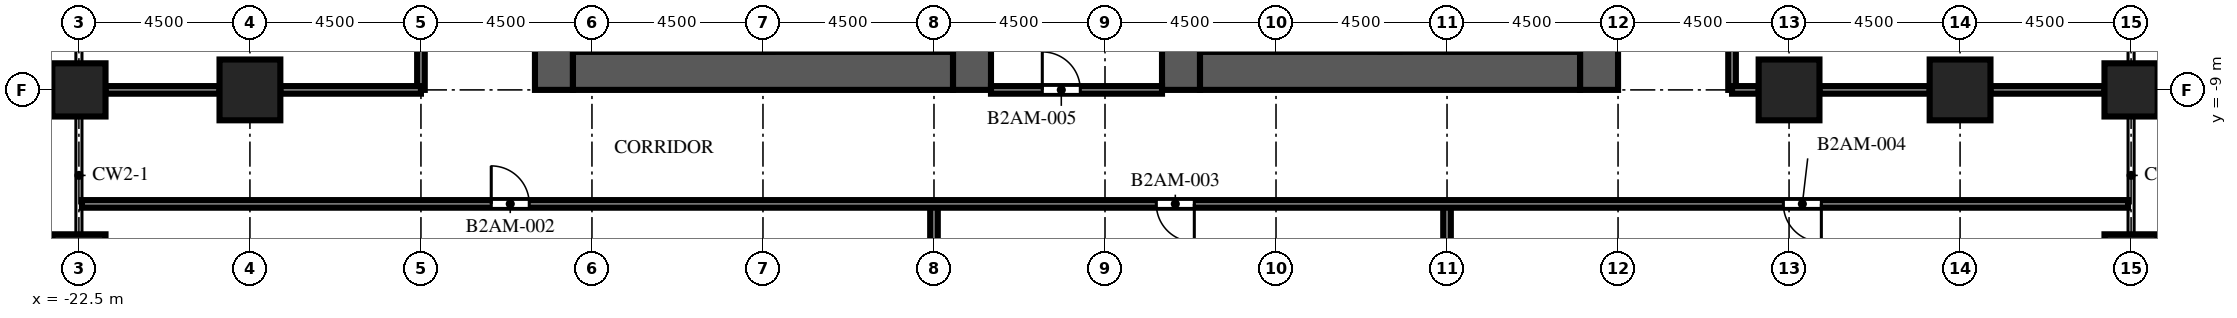
"""IFC4 building model, lengths in metres.
Left out: names, types, materials, properties, quantities, classifications, styles, units other than length and angle.
Written with IfcOpenShell. Run it as: python <this file> out.ifc"""

import sys

from ifc_helpers import new_model, si_unit, direction, frame, frame_2d, origin, origin_2d, place, context, subcontext, project, spatial, rectangle, extrude, element, fill, save


model = new_model("IFC4")
c1 = context("Model", 3, precision=1e-05, world=origin(), true_north=direction((0.0, 1.0)))
c2 = subcontext(c1, "Body", "Model", "MODEL_VIEW")
j1 = project(units=[si_unit("LENGTHUNIT", "METRE"), si_unit("PLANEANGLEUNIT", "RADIAN")], contexts=[c1])
p1 = place(None, origin())
s1 = spatial("IfcSite", under=j1, at=p1, CompositionType="ELEMENT")
p2 = place(p1, origin())
s2 = spatial("IfcBuilding", under=s1, at=p2, CompositionType="ELEMENT")
p3 = place(p2, frame((0.0, 0.0, 70.6)))
s3 = spatial("IfcBuildingStorey", under=s2, at=p3, CompositionType="ELEMENT", Elevation=70.6)
for number, where, z_axis, x_axis in (
    (1, (-22.5, -13.5, 0.0), (0.0, 0.0, 1.0), (1.0, 0.0, 0.0)),
    (2, (-22.5, -9.0, 0.0), (0.0, 0.0, 1.0), (1.0, 0.0, 0.0)),
    (3, (31.5, -13.5, 0.0), (0.0, 0.0, 1.0), (1.0, 0.0, 0.0)),
    (4, (31.5, -9.0, 0.0), (0.0, 0.0, 1.0), (1.0, 0.0, 0.0)),
):
    element("IfcColumn", number, at=place(p3, frame(where, z_axis=z_axis, x_axis=x_axis)), inside=s3, PredefinedType="COLUMN", context=c2, shape_type="SweptSolid", body=[
        extrude(rectangle(XDim=1.4, YDim=1.4, at=origin_2d()), origin(), (0.0, 0.0, 1.0), 6.0),
    ])
for number, where, z_axis, x_axis in (
    (5, (-18.0, -9.0, 0.0), (0.0, 0.0, 1.0), (1.0, 0.0, 0.0)),
    (6, (22.5, -9.0, 0.0), (0.0, 0.0, 1.0), (1.0, 0.0, 0.0)),
    (7, (27.0, -9.0, 0.0), (0.0, 0.0, 1.0), (1.0, 0.0, 0.0)),
):
    element("IfcColumn", number, at=place(p3, frame(where, z_axis=z_axis, x_axis=x_axis)), inside=s3, PredefinedType="COLUMN", context=c2, shape_type="SweptSolid", body=[
        extrude(rectangle(XDim=1.6, YDim=1.6, at=origin_2d()), origin(), (0.0, 0.0, 1.0), 6.0),
    ])
p4 = place(p3, frame((-10.0, -9.0, 0.0), z_axis=(0.0, 0.0, 1.0), x_axis=(0.0, 1.0, 0.0)))
e8 = element("IfcWall", 8, at=p4, inside=s3, PredefinedType="SHEAR", context=c2, shape_type="SweptSolid", body=[
    extrude(rectangle(XDim=27.5, YDim=1.0, at=frame_2d((13.75, 0.0))), origin(), (0.0, 0.0, 1.0), 6.0),
])
p5 = place(p4, frame((12.55, 0.0, 0.0)))
e9 = element("IfcOpeningElement", 9, at=p5, cuts=e8, PredefinedType="OPENING", context=c2, shape_type="SweptSolid", body=[
    extrude(rectangle(XDim=2.4, YDim=2.4, at=frame_2d((1.2, 1.2))), frame((0.0, 0.51, 0.0), z_axis=(0.0, -1.0, 0.0), x_axis=(1.0, 0.0, 0.0)), (0.0, 0.0, 1.0), 1.02),
])
p6 = place(p4, frame((6.825, 0.0, 0.0)))
e10 = element("IfcOpeningElement", 10, at=p6, cuts=e8, PredefinedType="OPENING", context=c2, shape_type="SweptSolid", body=[
    extrude(rectangle(XDim=1.2, YDim=2.1, at=frame_2d((0.6, 1.05))), frame((0.0, 0.51, 0.0), z_axis=(0.0, -1.0, 0.0), x_axis=(1.0, 0.0, 0.0)), (0.0, 0.0, 1.0), 1.02),
])
p7 = place(p4, frame((19.475, 0.0, 0.0)))
e11 = element("IfcOpeningElement", 11, at=p7, cuts=e8, PredefinedType="OPENING", context=c2, shape_type="SweptSolid", body=[
    extrude(rectangle(XDim=1.2, YDim=2.1, at=frame_2d((0.6, 1.05))), frame((0.0, 0.51, 0.0), z_axis=(0.0, -1.0, 0.0), x_axis=(1.0, 0.0, 0.0)), (0.0, 0.0, 1.0), 1.02),
])
p8 = place(p3, frame((1.0, -9.0, 0.0), z_axis=(0.0, 0.0, 1.0), x_axis=(0.0, 1.0, 0.0)))
e12 = element("IfcWall", 12, at=p8, inside=s3, PredefinedType="SHEAR", context=c2, shape_type="SweptSolid", body=[
    extrude(rectangle(XDim=27.5, YDim=1.0, at=frame_2d((13.75, 0.0))), origin(), (0.0, 0.0, 1.0), 6.0),
])
p9 = place(p8, frame((12.55, 0.0, 0.0)))
e13 = element("IfcOpeningElement", 13, at=p9, cuts=e12, PredefinedType="OPENING", context=c2, shape_type="SweptSolid", body=[
    extrude(rectangle(XDim=2.4, YDim=2.4, at=frame_2d((1.2, 1.2))), frame((0.0, 0.51, 0.0), z_axis=(0.0, -1.0, 0.0), x_axis=(1.0, 0.0, 0.0)), (0.0, 0.0, 1.0), 1.02),
])
p10 = place(p8, frame((5.475, 0.0, 0.0)))
e14 = element("IfcOpeningElement", 14, at=p10, cuts=e12, PredefinedType="OPENING", context=c2, shape_type="SweptSolid", body=[
    extrude(rectangle(XDim=1.2, YDim=2.1, at=frame_2d((0.6, 1.05))), frame((0.0, 0.51, 0.0), z_axis=(0.0, -1.0, 0.0), x_axis=(1.0, 0.0, 0.0)), (0.0, 0.0, 1.0), 1.02),
])
p11 = place(p8, frame((19.475, 0.0, 0.0)))
e15 = element("IfcOpeningElement", 15, at=p11, cuts=e12, PredefinedType="OPENING", context=c2, shape_type="SweptSolid", body=[
    extrude(rectangle(XDim=1.0, YDim=2.1, at=frame_2d((0.5, 1.05))), frame((0.0, 0.51, 0.0), z_axis=(0.0, -1.0, 0.0), x_axis=(1.0, 0.0, 0.0)), (0.0, 0.0, 1.0), 1.02),
])
p12 = place(p8, frame((21.106, 0.0, 0.0)))
e16 = element("IfcOpeningElement", 16, at=p12, cuts=e12, PredefinedType="OPENING", context=c2, shape_type="SweptSolid", body=[
    extrude(rectangle(XDim=1.0, YDim=2.1, at=frame_2d((0.5, 1.05))), frame((0.0, 0.51, 0.0), z_axis=(0.0, -1.0, 0.0), x_axis=(1.0, 0.0, 0.0)), (0.0, 0.0, 1.0), 1.02),
])
p13 = place(p8, frame((23.1, 0.0, 0.0)))
e17 = element("IfcOpeningElement", 17, at=p13, cuts=e12, PredefinedType="OPENING", context=c2, shape_type="SweptSolid", body=[
    extrude(rectangle(XDim=1.0, YDim=2.1, at=frame_2d((0.5, 1.05))), frame((0.0, 0.51, 0.0), z_axis=(0.0, -1.0, 0.0), x_axis=(1.0, 0.0, 0.0)), (0.0, 0.0, 1.0), 1.02),
])
p14 = place(p8, frame((25.094, 0.0, 0.0)))
e18 = element("IfcOpeningElement", 18, at=p14, cuts=e12, PredefinedType="OPENING", context=c2, shape_type="SweptSolid", body=[
    extrude(rectangle(XDim=1.0, YDim=2.1, at=frame_2d((0.5, 1.05))), frame((0.0, 0.51, 0.0), z_axis=(0.0, -1.0, 0.0), x_axis=(1.0, 0.0, 0.0)), (0.0, 0.0, 1.0), 1.02),
])
p15 = place(p3, frame((-9.5, -8.5, 0.0), z_axis=(0.0, 0.0, 1.0), x_axis=(1.0, 0.0, 0.0)))
e19 = element("IfcWall", 19, at=p15, inside=s3, PredefinedType="SHEAR", context=c2, shape_type="SweptSolid", body=[
    extrude(rectangle(XDim=10.0, YDim=1.0, at=frame_2d((5.0, 0.0))), origin(), (0.0, 0.0, 1.0), 6.0),
])
p16 = place(p3, frame((6.5, -9.0, 0.0), z_axis=(0.0, 0.0, 1.0), x_axis=(0.0, 1.0, 0.0)))
e20 = element("IfcWall", 20, at=p16, inside=s3, PredefinedType="SHEAR", context=c2, shape_type="SweptSolid", body=[
    extrude(rectangle(XDim=27.5, YDim=1.0, at=frame_2d((13.75, 0.0))), origin(), (0.0, 0.0, 1.0), 6.0),
])
p17 = place(p16, frame((12.55, 0.0, 0.0)))
e21 = element("IfcOpeningElement", 21, at=p17, cuts=e20, PredefinedType="OPENING", context=c2, shape_type="SweptSolid", body=[
    extrude(rectangle(XDim=2.4, YDim=2.4, at=frame_2d((1.2, 1.2))), frame((0.0, 0.51, 0.0), z_axis=(0.0, -1.0, 0.0), x_axis=(1.0, 0.0, 0.0)), (0.0, 0.0, 1.0), 1.02),
])
p18 = place(p16, frame((5.475, 0.0, 0.0)))
e22 = element("IfcOpeningElement", 22, at=p18, cuts=e20, PredefinedType="OPENING", context=c2, shape_type="SweptSolid", body=[
    extrude(rectangle(XDim=1.2, YDim=2.1, at=frame_2d((0.6, 1.05))), frame((0.0, 0.51, 0.0), z_axis=(0.0, -1.0, 0.0), x_axis=(1.0, 0.0, 0.0)), (0.0, 0.0, 1.0), 1.02),
])
p19 = place(p16, frame((19.475, 0.0, 0.0)))
e23 = element("IfcOpeningElement", 23, at=p19, cuts=e20, PredefinedType="OPENING", context=c2, shape_type="SweptSolid", body=[
    extrude(rectangle(XDim=1.0, YDim=2.1, at=frame_2d((0.5, 1.05))), frame((0.0, 0.51, 0.0), z_axis=(0.0, -1.0, 0.0), x_axis=(1.0, 0.0, 0.0)), (0.0, 0.0, 1.0), 1.02),
])
p20 = place(p16, frame((21.106, 0.0, 0.0)))
e24 = element("IfcOpeningElement", 24, at=p20, cuts=e20, PredefinedType="OPENING", context=c2, shape_type="SweptSolid", body=[
    extrude(rectangle(XDim=1.0, YDim=2.1, at=frame_2d((0.5, 1.05))), frame((0.0, 0.51, 0.0), z_axis=(0.0, -1.0, 0.0), x_axis=(1.0, 0.0, 0.0)), (0.0, 0.0, 1.0), 1.02),
])
p21 = place(p16, frame((23.1, 0.0, 0.0)))
e25 = element("IfcOpeningElement", 25, at=p21, cuts=e20, PredefinedType="OPENING", context=c2, shape_type="SweptSolid", body=[
    extrude(rectangle(XDim=1.0, YDim=2.1, at=frame_2d((0.5, 1.05))), frame((0.0, 0.51, 0.0), z_axis=(0.0, -1.0, 0.0), x_axis=(1.0, 0.0, 0.0)), (0.0, 0.0, 1.0), 1.02),
])
p22 = place(p16, frame((25.094, 0.0, 0.0)))
e26 = element("IfcOpeningElement", 26, at=p22, cuts=e20, PredefinedType="OPENING", context=c2, shape_type="SweptSolid", body=[
    extrude(rectangle(XDim=1.0, YDim=2.1, at=frame_2d((0.5, 1.05))), frame((0.0, 0.51, 0.0), z_axis=(0.0, -1.0, 0.0), x_axis=(1.0, 0.0, 0.0)), (0.0, 0.0, 1.0), 1.02),
])
p23 = place(p3, frame((17.5, -9.0, 0.0), z_axis=(0.0, 0.0, 1.0), x_axis=(0.0, 1.0, 0.0)))
e27 = element("IfcWall", 27, at=p23, inside=s3, PredefinedType="SHEAR", context=c2, shape_type="SweptSolid", body=[
    extrude(rectangle(XDim=27.5, YDim=1.0, at=frame_2d((13.75, 0.0))), origin(), (0.0, 0.0, 1.0), 6.0),
])
p24 = place(p23, frame((12.55, 0.0, 0.0)))
e28 = element("IfcOpeningElement", 28, at=p24, cuts=e27, PredefinedType="OPENING", context=c2, shape_type="SweptSolid", body=[
    extrude(rectangle(XDim=2.4, YDim=2.4, at=frame_2d((1.2, 1.2))), frame((0.0, 0.51, 0.0), z_axis=(0.0, -1.0, 0.0), x_axis=(1.0, 0.0, 0.0)), (0.0, 0.0, 1.0), 1.02),
])
p25 = place(p23, frame((6.825, 0.0, 0.0)))
e29 = element("IfcOpeningElement", 29, at=p25, cuts=e27, PredefinedType="OPENING", context=c2, shape_type="SweptSolid", body=[
    extrude(rectangle(XDim=1.2, YDim=2.1, at=frame_2d((0.6, 1.05))), frame((0.0, 0.51, 0.0), z_axis=(0.0, -1.0, 0.0), x_axis=(1.0, 0.0, 0.0)), (0.0, 0.0, 1.0), 1.02),
])
p26 = place(p23, frame((19.475, 0.0, 0.0)))
e30 = element("IfcOpeningElement", 30, at=p26, cuts=e27, PredefinedType="OPENING", context=c2, shape_type="SweptSolid", body=[
    extrude(rectangle(XDim=1.2, YDim=2.1, at=frame_2d((0.6, 1.05))), frame((0.0, 0.51, 0.0), z_axis=(0.0, -1.0, 0.0), x_axis=(1.0, 0.0, 0.0)), (0.0, 0.0, 1.0), 1.02),
])
p27 = place(p3, frame((7.0, -8.5, 0.0), z_axis=(0.0, 0.0, 1.0), x_axis=(1.0, 0.0, 0.0)))
e31 = element("IfcWall", 31, at=p27, inside=s3, PredefinedType="SHEAR", context=c2, shape_type="SweptSolid", body=[
    extrude(rectangle(XDim=10.0, YDim=1.0, at=frame_2d((5.0, 0.0))), origin(), (0.0, 0.0, 1.0), 6.0),
])
p28 = place(p3, frame((-13.5, -9.0, 0.0), z_axis=(0.0, 0.0, 1.0), x_axis=(0.0, 1.0, 0.0)))
e32 = element("IfcWall", 32, at=p28, inside=s3, PredefinedType="PARTITIONING", context=c2, shape_type="SweptSolid", body=[
    extrude(rectangle(XDim=27.5, YDim=0.2, at=frame_2d((13.75, 0.0))), origin(), (0.0, 0.0, 1.0), 5.4),
])
p29 = place(p28, frame((10.85, 0.0, 0.0)))
e33 = element("IfcOpeningElement", 33, at=p29, cuts=e32, PredefinedType="OPENING", context=c2, shape_type="SweptSolid", body=[
    extrude(rectangle(XDim=1.0, YDim=2.1, at=frame_2d((0.5, 1.05))), frame((0.0, 0.11, 0.0), z_axis=(0.0, -1.0, 0.0), x_axis=(1.0, 0.0, 0.0)), (0.0, 0.0, 1.0), 0.22),
])
p30 = place(p3, frame((0.0, -17.2, 0.0), z_axis=(0.0, 0.0, 1.0), x_axis=(0.0, 1.0, 0.0)))
e34 = element("IfcWall", 34, at=p30, inside=s3, PredefinedType="PARTITIONING", context=c2, shape_type="SweptSolid", body=[
    extrude(rectangle(XDim=5.2, YDim=0.2, at=frame_2d((2.6, 0.0))), origin(), (0.0, 0.0, 1.0), 5.4),
])
p31 = place(p3, frame((13.5, -22.05, 0.0), z_axis=(0.0, 0.0, 1.0), x_axis=(0.0, 1.0, 0.0)))
e35 = element("IfcWall", 35, at=p31, inside=s3, PredefinedType="PARTITIONING", context=c2, shape_type="SweptSolid", body=[
    extrude(rectangle(XDim=10.05, YDim=0.2, at=frame_2d((5.025, 0.0))), origin(), (0.0, 0.0, 1.0), 5.4),
])
p32 = place(p3, frame((21.0, 18.5, 0.0), z_axis=(0.0, 0.0, 1.0), x_axis=(0.0, -1.0, 0.0)))
e36 = element("IfcWall", 36, at=p32, inside=s3, PredefinedType="PARTITIONING", context=c2, shape_type="SweptSolid", body=[
    extrude(rectangle(XDim=27.5, YDim=0.2, at=frame_2d((13.75, 0.0))), origin(), (0.0, 0.0, 1.0), 5.4),
])
p33 = place(p32, frame((19.4, 0.0, 0.0)))
e37 = element("IfcOpeningElement", 37, at=p33, cuts=e36, PredefinedType="OPENING", context=c2, shape_type="SweptSolid", body=[
    extrude(rectangle(XDim=1.0, YDim=2.1, at=frame_2d((0.5, 1.05))), frame((0.0, 0.11, 0.0), z_axis=(0.0, -1.0, 0.0), x_axis=(1.0, 0.0, 0.0)), (0.0, 0.0, 1.0), 0.22),
])
p34 = place(p3, frame((31.42, -12.0, 0.0), z_axis=(0.0, 0.0, 1.0), x_axis=(-1.0, 0.0, 0.0)))
e38 = element("IfcWall", 38, at=p34, inside=s3, PredefinedType="PARTITIONING", context=c2, shape_type="SweptSolid", body=[
    extrude(rectangle(XDim=53.84, YDim=0.2, at=frame_2d((26.92, 0.0))), origin(), (0.0, 0.0, 1.0), 5.4),
])
p35 = place(p34, frame((42.07, 0.0, 0.0)))
e39 = element("IfcOpeningElement", 39, at=p35, cuts=e38, PredefinedType="OPENING", context=c2, shape_type="SweptSolid", body=[
    extrude(rectangle(XDim=1.0, YDim=2.1, at=frame_2d((0.5, 1.05))), frame((0.0, 0.11, 0.0), z_axis=(0.0, -1.0, 0.0), x_axis=(1.0, 0.0, 0.0)), (0.0, 0.0, 1.0), 0.22),
])
p36 = place(p34, frame((24.57, 0.0, 0.0)))
e40 = element("IfcOpeningElement", 40, at=p36, cuts=e38, PredefinedType="OPENING", context=c2, shape_type="SweptSolid", body=[
    extrude(rectangle(XDim=1.0, YDim=2.1, at=frame_2d((0.5, 1.05))), frame((0.0, 0.11, 0.0), z_axis=(0.0, -1.0, 0.0), x_axis=(1.0, 0.0, 0.0)), (0.0, 0.0, 1.0), 0.22),
])
p37 = place(p34, frame((8.07, 0.0, 0.0)))
e41 = element("IfcOpeningElement", 41, at=p37, cuts=e38, PredefinedType="OPENING", context=c2, shape_type="SweptSolid", body=[
    extrude(rectangle(XDim=1.0, YDim=2.1, at=frame_2d((0.5, 1.05))), frame((0.0, 0.11, 0.0), z_axis=(0.0, -1.0, 0.0), x_axis=(1.0, 0.0, 0.0)), (0.0, 0.0, 1.0), 0.22),
])
p38 = place(p3, frame((-21.8, -9.0, 0.0), z_axis=(0.0, 0.0, 1.0), x_axis=(1.0, 0.0, 0.0)))
e42 = element("IfcWall", 42, at=p38, inside=s3, PredefinedType="PARTITIONING", context=c2, shape_type="SweptSolid", body=[
    extrude(rectangle(XDim=3.0, YDim=0.2, at=frame_2d((1.5, 0.0))), origin(), (0.0, 0.0, 1.0), 5.4),
])
p39 = place(p3, frame((-17.2, -9.0, 0.0), z_axis=(0.0, 0.0, 1.0), x_axis=(1.0, 0.0, 0.0)))
e43 = element("IfcWall", 43, at=p39, inside=s3, PredefinedType="PARTITIONING", context=c2, shape_type="SweptSolid", body=[
    extrude(rectangle(XDim=3.7, YDim=0.2, at=frame_2d((1.85, 0.0))), origin(), (0.0, 0.0, 1.0), 5.4),
])
p40 = place(p3, frame((1.5, -9.0, 0.0), z_axis=(0.0, 0.0, 1.0), x_axis=(1.0, 0.0, 0.0)))
e44 = element("IfcWall", 44, at=p40, inside=s3, PredefinedType="PARTITIONING", context=c2, shape_type="SweptSolid", body=[
    extrude(rectangle(XDim=4.5, YDim=0.2, at=frame_2d((2.25, 0.0))), origin(), (0.0, 0.0, 1.0), 5.4),
])
p41 = place(p40, frame((1.35, 0.0, 0.0)))
e45 = element("IfcOpeningElement", 45, at=p41, cuts=e44, PredefinedType="OPENING", context=c2, shape_type="SweptSolid", body=[
    extrude(rectangle(XDim=1.0, YDim=2.1, at=frame_2d((0.5, 1.05))), frame((0.0, 0.11, 0.0), z_axis=(0.0, -1.0, 0.0), x_axis=(1.0, 0.0, 0.0)), (0.0, 0.0, 1.0), 0.22),
])
p42 = place(p3, frame((21.0, -9.0, 0.0), z_axis=(0.0, 0.0, 1.0), x_axis=(1.0, 0.0, 0.0)))
e46 = element("IfcWall", 46, at=p42, inside=s3, PredefinedType="PARTITIONING", context=c2, shape_type="SweptSolid", body=[
    extrude(rectangle(XDim=0.7, YDim=0.2, at=frame_2d((0.35, 0.0))), origin(), (0.0, 0.0, 1.0), 5.4),
])
p43 = place(p3, frame((23.3, -9.0, 0.0), z_axis=(0.0, 0.0, 1.0), x_axis=(1.0, 0.0, 0.0)))
e47 = element("IfcWall", 47, at=p43, inside=s3, PredefinedType="PARTITIONING", context=c2, shape_type="SweptSolid", body=[
    extrude(rectangle(XDim=2.9, YDim=0.2, at=frame_2d((1.45, 0.0))), origin(), (0.0, 0.0, 1.0), 5.4),
])
p44 = place(p3, frame((27.8, -9.0, 0.0), z_axis=(0.0, 0.0, 1.0), x_axis=(1.0, 0.0, 0.0)))
e48 = element("IfcWall", 48, at=p44, inside=s3, PredefinedType="PARTITIONING", context=c2, shape_type="SweptSolid", body=[
    extrude(rectangle(XDim=3.0, YDim=0.2, at=frame_2d((1.5, 0.0))), origin(), (0.0, 0.0, 1.0), 5.4),
])
p45 = place(p35, origin())
e49 = element("IfcDoor", 49, at=p45, inside=s3, OperationType="SINGLE_SWING_RIGHT", PredefinedType="DOOR", context=c2, shape_type="SweptSolid", body=[
    extrude(rectangle(XDim=1.0, YDim=2.1, at=frame_2d((0.5, 1.05))), frame((0.0, 0.025, 0.0), z_axis=(0.0, -1.0, 0.0), x_axis=(1.0, 0.0, 0.0)), (0.0, 0.0, 1.0), 0.05),
])
fill(e39, e49)
p46 = place(p36, origin())
e50 = element("IfcDoor", 50, at=p46, inside=s3, OperationType="SINGLE_SWING_LEFT", PredefinedType="DOOR", context=c2, shape_type="SweptSolid", body=[
    extrude(rectangle(XDim=1.0, YDim=2.1, at=frame_2d((0.5, 1.05))), frame((0.0, 0.025, 0.0), z_axis=(0.0, -1.0, 0.0), x_axis=(1.0, 0.0, 0.0)), (0.0, 0.0, 1.0), 0.05),
])
fill(e40, e50)
p47 = place(p37, origin())
e51 = element("IfcDoor", 51, at=p47, inside=s3, OperationType="SINGLE_SWING_LEFT", PredefinedType="DOOR", context=c2, shape_type="SweptSolid", body=[
    extrude(rectangle(XDim=1.0, YDim=2.1, at=frame_2d((0.5, 1.05))), frame((0.0, 0.025, 0.0), z_axis=(0.0, -1.0, 0.0), x_axis=(1.0, 0.0, 0.0)), (0.0, 0.0, 1.0), 0.05),
])
fill(e41, e51)
p48 = place(p41, origin())
e52 = element("IfcDoor", 52, at=p48, inside=s3, OperationType="SINGLE_SWING_LEFT", PredefinedType="DOOR", context=c2, shape_type="SweptSolid", body=[
    extrude(rectangle(XDim=1.0, YDim=2.1, at=frame_2d((0.5, 1.05))), frame((0.0, 0.025, 0.0), z_axis=(0.0, -1.0, 0.0), x_axis=(1.0, 0.0, 0.0)), (0.0, 0.0, 1.0), 0.05),
])
fill(e45, e52)
save(model, sys.argv[1])
